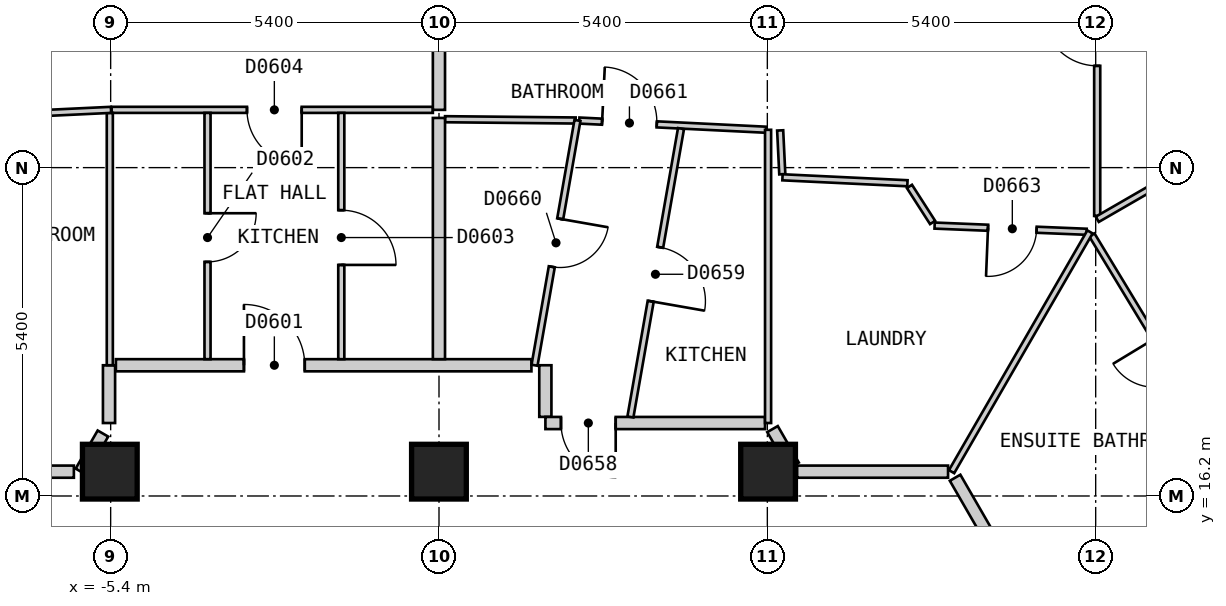
"""IFC4 building model, lengths in metres.
Left out: names, types, materials, properties, quantities, classifications, styles, units other than length and angle.
Written with IfcOpenShell. Run it as: python <this file> out.ifc"""

import sys

from ifc_helpers import new_model, si_unit, direction, frame, frame_2d, origin, origin_2d, place, context, subcontext, project, spatial, rectangle, extrude, element, fill, save


model = new_model("IFC4")
c1 = context("Model", 3, precision=1e-05, world=origin(), true_north=direction((0.0, 1.0)))
c2 = subcontext(c1, "Body", "Model", "MODEL_VIEW")
j1 = project(units=[si_unit("LENGTHUNIT", "METRE"), si_unit("PLANEANGLEUNIT", "RADIAN")], contexts=[c1])
p1 = place(None, origin())
s1 = spatial("IfcSite", under=j1, at=p1, CompositionType="ELEMENT")
p2 = place(p1, origin())
s2 = spatial("IfcBuilding", under=s1, at=p2, CompositionType="ELEMENT")
p3 = place(p2, frame((0.0, 0.0, 81.0)))
s3 = spatial("IfcBuildingStorey", under=s2, at=p3, CompositionType="ELEMENT", Elevation=81.0)
for number, where, z_axis, x_axis in (
    (1, (5.412, 16.6, 0.0), (0.0, 0.0, 1.0), (-1.0, 0.0, 0.0)),
    (2, (-0.001, 16.6, 0.0), (0.0, 0.0, 1.0), (-1.0, 0.0, 0.0)),
    (3, (-5.414, 16.6, 0.0), (0.0, 0.0, 1.0), (-1.0, 0.0, 0.0)),
):
    element("IfcColumn", number, at=place(p3, frame(where, z_axis=z_axis, x_axis=x_axis)), inside=s3, PredefinedType="COLUMN", context=c2, shape_type="SweptSolid", body=[
        extrude(rectangle(XDim=0.9, YDim=0.9, at=origin_2d()), origin(), (0.0, 0.0, 1.0), 3.0),
    ])
p4 = place(p3, frame((5.485, 17.3, 0.0), z_axis=(0.0, 0.0, 1.0), x_axis=(0.499437640892, -0.866349838611, 0.0)))
e4 = element("IfcWall", 4, at=p4, inside=s3, PredefinedType="PARTITIONING", context=c2, shape_type="SweptSolid", body=[
    extrude(rectangle(XDim=0.693, YDim=0.2, at=frame_2d((0.346, 0.0))), origin(), (0.0, 0.0, 1.0), 2.7),
])
p5 = place(p3, frame((8.488, 16.5, 0.0), z_axis=(0.0, 0.0, 1.0), x_axis=(0.499986836607, -0.86603300354, 0.0)))
e5 = element("IfcWall", 5, at=p5, inside=s3, PredefinedType="PARTITIONING", context=c2, shape_type="SweptSolid", body=[
    extrude(rectangle(XDim=20.09, YDim=0.2, at=frame_2d((10.045, 0.0))), origin(), (0.0, 0.0, 1.0), 2.7),
])
p6 = place(p5, frame((14.569, 0.0, 0.0)))
e6 = element("IfcOpeningElement", 6, at=p6, cuts=e5, PredefinedType="OPENING", context=c2, shape_type="SweptSolid", body=[
    extrude(rectangle(XDim=1.0, YDim=2.1, at=frame_2d((0.5, 1.05))), frame((0.0, 0.11, 0.0), z_axis=(0.0, -1.0, 0.0), x_axis=(1.0, 0.0, 0.0)), (0.0, 0.0, 1.0), 0.22),
])
p7 = place(p3, frame((1.749, 18.35, 0.0), z_axis=(0.0, 0.0, 1.0), x_axis=(0.0, -1.0, 0.0)))
e7 = element("IfcWall", 7, at=p7, inside=s3, PredefinedType="PARTITIONING", context=c2, shape_type="SweptSolid", body=[
    extrude(rectangle(XDim=0.849, YDim=0.2, at=frame_2d((0.425, 0.0))), origin(), (0.0, 0.0, 1.0), 2.7),
])
p8 = place(p3, frame((-8.314, 16.6, 0.0), z_axis=(0.0, 0.0, 1.0), x_axis=(1.0, 0.0, 0.0)))
e8 = element("IfcWall", 8, at=p8, inside=s3, PredefinedType="PARTITIONING", context=c2, shape_type="SweptSolid", body=[
    extrude(rectangle(XDim=2.309, YDim=0.2, at=frame_2d((1.155, 0.0))), origin(), (0.0, 0.0, 1.0), 2.7),
])
p9 = place(p3, frame((5.889, 16.6, 0.0), z_axis=(0.0, 0.0, 1.0), x_axis=(1.0, 0.0, 0.0)))
e9 = element("IfcWall", 9, at=p9, inside=s3, PredefinedType="PARTITIONING", context=c2, shape_type="SweptSolid", body=[
    extrude(rectangle(XDim=2.483, YDim=0.2, at=frame_2d((1.242, 0.0))), origin(), (0.0, 0.0, 1.0), 2.7),
])
p10 = place(p3, frame((1.75, 17.4, 0.0), z_axis=(0.0, 0.0, 1.0), x_axis=(1.0, 0.0, 0.0)))
e10 = element("IfcWall", 10, at=p10, inside=s3, PredefinedType="PARTITIONING", context=c2, shape_type="SweptSolid", body=[
    extrude(rectangle(XDim=3.612, YDim=0.2, at=frame_2d((1.806, 0.0))), origin(), (0.0, 0.0, 1.0), 2.7),
])
p11 = place(p10, frame((0.256, 0.0, 0.0)))
e11 = element("IfcOpeningElement", 11, at=p11, cuts=e10, PredefinedType="OPENING", context=c2, shape_type="SweptSolid", body=[
    extrude(rectangle(XDim=0.9, YDim=2.1, at=frame_2d((0.45, 1.05))), frame((0.0, 0.11, 0.0), z_axis=(0.0, -1.0, 0.0), x_axis=(1.0, 0.0, 0.0)), (0.0, 0.0, 1.0), 0.22),
])
p12 = place(p3, frame((-5.314, 18.35, 0.0), z_axis=(0.0, 0.0, 1.0), x_axis=(1.0, 0.0, 0.0)))
e12 = element("IfcWall", 12, at=p12, inside=s3, PredefinedType="PARTITIONING", context=c2, shape_type="SweptSolid", body=[
    extrude(rectangle(XDim=6.834, YDim=0.2, at=frame_2d((3.417, 0.0))), origin(), (0.0, 0.0, 1.0), 2.7),
])
p13 = place(p12, frame((2.106, 0.0, 0.0)))
e13 = element("IfcOpeningElement", 13, at=p13, cuts=e12, PredefinedType="OPENING", context=c2, shape_type="SweptSolid", body=[
    extrude(rectangle(XDim=1.0, YDim=2.1, at=frame_2d((0.5, 1.05))), frame((0.0, 0.11, 0.0), z_axis=(0.0, -1.0, 0.0), x_axis=(1.0, 0.0, 0.0)), (0.0, 0.0, 1.0), 0.22),
])
p14 = place(p3, frame((-5.889, 16.6, 0.0), z_axis=(0.0, 0.0, 1.0), x_axis=(0.499839240638, 0.866118198353, 0.0)))
e14 = element("IfcWall", 14, at=p14, inside=s3, PredefinedType="PARTITIONING", context=c2, shape_type="SweptSolid", body=[
    extrude(rectangle(XDim=0.724, YDim=0.2, at=frame_2d((0.362, 0.0))), origin(), (0.0, 0.0, 1.0), 2.7),
])
p15 = place(p3, frame((-5.427, 17.4, 0.0), z_axis=(0.0, 0.0, 1.0), x_axis=(0.0, 1.0, 0.0)))
e15 = element("IfcWall", 15, at=p15, inside=s3, PredefinedType="PARTITIONING", context=c2, shape_type="SweptSolid", body=[
    extrude(rectangle(XDim=0.95, YDim=0.2, at=frame_2d((0.475, 0.0))), origin(), (0.0, 0.0, 1.0), 2.7),
])
p16 = place(p3, frame((0.099, 22.396, 0.0), z_axis=(0.0, 0.0, 1.0), x_axis=(0.999952228611, -0.009774481889, 0.0)))
e16 = element("IfcWall", 16, at=p16, inside=s3, PredefinedType="PARTITIONING", context=c2, shape_type="SweptSolid", body=[
    extrude(rectangle(XDim=2.148, YDim=0.1, at=frame_2d((1.074, 0.0))), origin(), (0.0, 0.0, 1.0), 2.7),
])
p17 = place(p3, frame((7.737, 21.291, 0.0), z_axis=(0.0, 0.0, 1.0), x_axis=(0.540389876456, -0.841414749944, 0.0)))
e17 = element("IfcWall", 17, at=p17, inside=s3, PredefinedType="PARTITIONING", context=c2, shape_type="SweptSolid", body=[
    extrude(rectangle(XDim=0.705, YDim=0.1, at=frame_2d((0.353, 0.0))), origin(), (0.0, 0.0, 1.0), 2.7),
])
p18 = place(p3, frame((10.738, 20.492, 0.0), z_axis=(0.0, 0.0, 1.0), x_axis=(0.518100976056, -0.855319459974, 0.0)))
e18 = element("IfcWall", 18, at=p18, inside=s3, PredefinedType="PARTITIONING", context=c2, shape_type="SweptSolid", body=[
    extrude(rectangle(XDim=4.744, YDim=0.1, at=frame_2d((2.372, 0.0))), origin(), (0.0, 0.0, 1.0), 2.7),
])
p19 = place(p18, frame((1.992, 0.0, 0.0)))
e19 = element("IfcOpeningElement", 19, at=p19, cuts=e18, PredefinedType="OPENING", context=c2, shape_type="SweptSolid", body=[
    extrude(rectangle(XDim=0.8, YDim=2.1, at=frame_2d((0.4, 1.05))), frame((0.0, 0.06, 0.0), z_axis=(0.0, -1.0, 0.0), x_axis=(1.0, 0.0, 0.0)), (0.0, 0.0, 1.0), 0.12),
])
p20 = place(p3, frame((5.611, 22.212, 0.0), z_axis=(0.0, 0.0, 1.0), x_axis=(0.048368650834, -0.998829551834, 0.0)))
e20 = element("IfcWall", 20, at=p20, inside=s3, PredefinedType="PARTITIONING", context=c2, shape_type="SweptSolid", body=[
    extrude(rectangle(XDim=0.722, YDim=0.1, at=frame_2d((0.361, 0.0))), origin(), (0.0, 0.0, 1.0), 2.7),
])
p21 = place(p3, frame((8.151, 20.647, 0.0), z_axis=(0.0, 0.0, 1.0), x_axis=(0.999167241152, -0.040802257405, 0.0)))
e21 = element("IfcWall", 21, at=p21, inside=s3, PredefinedType="PARTITIONING", context=c2, shape_type="SweptSolid", body=[
    extrude(rectangle(XDim=2.501, YDim=0.1, at=frame_2d((1.25, 0.0))), origin(), (0.0, 0.0, 1.0), 2.7),
])
p22 = place(p21, frame((0.879, 0.0, 0.0)))
e22 = element("IfcOpeningElement", 22, at=p22, cuts=e21, PredefinedType="OPENING", context=c2, shape_type="SweptSolid", body=[
    extrude(rectangle(XDim=0.8, YDim=2.1, at=frame_2d((0.4, 1.05))), frame((0.0, 0.06, 0.0), z_axis=(0.0, -1.0, 0.0), x_axis=(1.0, 0.0, 0.0)), (0.0, 0.0, 1.0), 0.12),
])
p23 = place(p3, frame((5.649, 21.441, 0.0), z_axis=(0.0, 0.0, 1.0), x_axis=(0.998867332207, -0.047582062273, 0.0)))
e23 = element("IfcWall", 23, at=p23, inside=s3, PredefinedType="PARTITIONING", context=c2, shape_type="SweptSolid", body=[
    extrude(rectangle(XDim=2.058, YDim=0.1, at=frame_2d((1.029, 0.0))), origin(), (0.0, 0.0, 1.0), 2.7),
])
p24 = place(p3, frame((2.307, 22.374, 0.0), z_axis=(0.0, 0.0, 1.0), x_axis=(0.998794685853, -0.049083352695, 0.0)))
e24 = element("IfcWall", 24, at=p24, inside=s3, PredefinedType="PARTITIONING", context=c2, shape_type="SweptSolid", body=[
    extrude(rectangle(XDim=3.079, YDim=0.1, at=frame_2d((1.54, 0.0))), origin(), (0.0, 0.0, 1.0), 2.7),
])
p25 = place(p24, frame((0.376, 0.0, 0.0)))
e25 = element("IfcOpeningElement", 25, at=p25, cuts=e24, PredefinedType="OPENING", context=c2, shape_type="SweptSolid", body=[
    extrude(rectangle(XDim=0.9, YDim=2.1, at=frame_2d((0.45, 1.05))), frame((0.0, 0.06, 0.0), z_axis=(0.0, -1.0, 0.0), x_axis=(1.0, 0.0, 0.0)), (0.0, 0.0, 1.0), 0.12),
])
p26 = place(p3, frame((-5.384, 22.55, 0.0), z_axis=(0.0, 0.0, 1.0), x_axis=(1.0, 0.0, 0.0)))
e26 = element("IfcWall", 26, at=p26, inside=s3, PredefinedType="PARTITIONING", context=c2, shape_type="SweptSolid", body=[
    extrude(rectangle(XDim=5.283, YDim=0.1, at=frame_2d((2.642, 0.0))), origin(), (0.0, 0.0, 1.0), 2.7),
])
p27 = place(p26, frame((2.226, 0.0, 0.0)))
e27 = element("IfcOpeningElement", 27, at=p27, cuts=e26, PredefinedType="OPENING", context=c2, shape_type="SweptSolid", body=[
    extrude(rectangle(XDim=0.9, YDim=2.1, at=frame_2d((0.45, 1.05))), frame((0.0, 0.06, 0.0), z_axis=(0.0, -1.0, 0.0), x_axis=(1.0, 0.0, 0.0)), (0.0, 0.0, 1.0), 0.12),
])
p28 = place(p3, frame((8.43, 16.6, 0.0), z_axis=(0.0, 0.0, 1.0), x_axis=(0.499951460778, 0.866053426104, 0.0)))
e28 = element("IfcWall", 28, at=p28, inside=s3, PredefinedType="PARTITIONING", context=c2, shape_type="SweptSolid", body=[
    extrude(rectangle(XDim=4.553, YDim=0.1, at=frame_2d((2.276, 0.0))), origin(), (0.0, 0.0, 1.0), 2.7),
])
p29 = place(p3, frame((3.148, 17.5, 0.0), z_axis=(0.0, 0.0, 1.0), x_axis=(0.172821918451, 0.984953087463, 0.0)))
e29 = element("IfcWall", 29, at=p29, inside=s3, PredefinedType="PARTITIONING", context=c2, shape_type="SweptSolid", body=[
    extrude(rectangle(XDim=4.814, YDim=0.1, at=frame_2d((2.407, 0.0))), origin(), (0.0, 0.0, 1.0), 2.7),
])
p30 = place(p29, frame((1.932, 0.0, 0.0)))
e30 = element("IfcOpeningElement", 30, at=p30, cuts=e29, PredefinedType="OPENING", context=c2, shape_type="SweptSolid", body=[
    extrude(rectangle(XDim=0.9, YDim=2.1, at=frame_2d((0.45, 1.05))), frame((0.0, 0.06, 0.0), z_axis=(0.0, -1.0, 0.0), x_axis=(1.0, 0.0, 0.0)), (0.0, 0.0, 1.0), 0.12),
])
p31 = place(p3, frame((1.571, 18.35, 0.0), z_axis=(0.0, 0.0, 1.0), x_axis=(0.172742546726, 0.984967010895, 0.0)))
e31 = element("IfcWall", 31, at=p31, inside=s3, PredefinedType="PARTITIONING", context=c2, shape_type="SweptSolid", body=[
    extrude(rectangle(XDim=4.087, YDim=0.1, at=frame_2d((2.044, 0.0))), origin(), (0.0, 0.0, 1.0), 2.7),
])
p32 = place(p31, frame((1.644, 0.0, 0.0)))
e32 = element("IfcOpeningElement", 32, at=p32, cuts=e31, PredefinedType="OPENING", context=c2, shape_type="SweptSolid", body=[
    extrude(rectangle(XDim=0.8, YDim=2.1, at=frame_2d((0.4, 1.05))), frame((0.0, 0.06, 0.0), z_axis=(0.0, -1.0, 0.0), x_axis=(1.0, 0.0, 0.0)), (0.0, 0.0, 1.0), 0.12),
])
p33 = place(p3, frame((5.412, 17.4, 0.0), z_axis=(0.0, 0.0, 1.0), x_axis=(0.0, 1.0, 0.0)))
e33 = element("IfcWall", 33, at=p33, inside=s3, PredefinedType="PARTITIONING", context=c2, shape_type="SweptSolid", body=[
    extrude(rectangle(XDim=4.822, YDim=0.1, at=frame_2d((2.411, 0.0))), origin(), (0.0, 0.0, 1.0), 2.7),
])
p34 = place(p3, frame((10.825, 20.806, 0.0), z_axis=(0.0, 0.0, 1.0), x_axis=(0.0, 1.0, 0.0)))
e34 = element("IfcWall", 34, at=p34, inside=s3, PredefinedType="PARTITIONING", context=c2, shape_type="SweptSolid", body=[
    extrude(rectangle(XDim=5.894, YDim=0.1, at=frame_2d((2.947, 0.0))), origin(), (0.0, 0.0, 1.0), 2.7),
])
p35 = place(p34, frame((2.468, 0.0, 0.0)))
e35 = element("IfcOpeningElement", 35, at=p35, cuts=e34, PredefinedType="OPENING", context=c2, shape_type="SweptSolid", body=[
    extrude(rectangle(XDim=0.9, YDim=2.1, at=frame_2d((0.45, 1.05))), frame((0.0, 0.06, 0.0), z_axis=(0.0, -1.0, 0.0), x_axis=(1.0, 0.0, 0.0)), (0.0, 0.0, 1.0), 0.12),
])
p36 = place(p3, frame((-3.807, 18.45, 0.0), z_axis=(0.0, 0.0, 1.0), x_axis=(0.0, 1.0, 0.0)))
e36 = element("IfcWall", 36, at=p36, inside=s3, PredefinedType="PARTITIONING", context=c2, shape_type="SweptSolid", body=[
    extrude(rectangle(XDim=4.05, YDim=0.1, at=frame_2d((2.025, 0.0))), origin(), (0.0, 0.0, 1.0), 2.7),
])
p37 = place(p36, frame((1.6, 0.0, 0.0)))
e37 = element("IfcOpeningElement", 37, at=p37, cuts=e36, PredefinedType="OPENING", context=c2, shape_type="SweptSolid", body=[
    extrude(rectangle(XDim=0.8, YDim=2.1, at=frame_2d((0.4, 1.05))), frame((0.0, 0.06, 0.0), z_axis=(0.0, -1.0, 0.0), x_axis=(1.0, 0.0, 0.0)), (0.0, 0.0, 1.0), 0.12),
])
p38 = place(p3, frame((-5.414, 18.35, 0.0), z_axis=(0.0, 0.0, 1.0), x_axis=(0.0, 1.0, 0.0)))
e38 = element("IfcWall", 38, at=p38, inside=s3, PredefinedType="PARTITIONING", context=c2, shape_type="SweptSolid", body=[
    extrude(rectangle(XDim=4.15, YDim=0.1, at=frame_2d((2.075, 0.0))), origin(), (0.0, 0.0, 1.0), 2.7),
])
p39 = place(p3, frame((-1.607, 18.45, 0.0), z_axis=(0.0, 0.0, 1.0), x_axis=(0.0, 1.0, 0.0)))
e39 = element("IfcWall", 39, at=p39, inside=s3, PredefinedType="PARTITIONING", context=c2, shape_type="SweptSolid", body=[
    extrude(rectangle(XDim=4.05, YDim=0.1, at=frame_2d((2.025, 0.0))), origin(), (0.0, 0.0, 1.0), 2.7),
])
p40 = place(p39, frame((1.55, 0.0, 0.0)))
e40 = element("IfcOpeningElement", 40, at=p40, cuts=e39, PredefinedType="OPENING", context=c2, shape_type="SweptSolid", body=[
    extrude(rectangle(XDim=0.9, YDim=2.1, at=frame_2d((0.45, 1.05))), frame((0.0, 0.06, 0.0), z_axis=(0.0, -1.0, 0.0), x_axis=(1.0, 0.0, 0.0)), (0.0, 0.0, 1.0), 0.12),
])
p41 = place(p3, frame((-9.435, 22.358, 0.0), z_axis=(0.0, 0.0, 1.0), x_axis=(0.998871548472, 0.04749346959, 0.0)))
e41 = element("IfcWall", 41, at=p41, inside=s3, PredefinedType="PARTITIONING", context=c2, shape_type="SweptSolid", body=[
    extrude(rectangle(XDim=4.046, YDim=0.1, at=frame_2d((2.023, 0.0))), origin(), (0.0, 0.0, 1.0), 2.7),
])
p42 = place(p41, frame((1.555, 0.0, 0.0)))
e42 = element("IfcOpeningElement", 42, at=p42, cuts=e41, PredefinedType="OPENING", context=c2, shape_type="SweptSolid", body=[
    extrude(rectangle(XDim=0.8, YDim=2.1, at=frame_2d((0.4, 1.05))), frame((0.0, 0.06, 0.0), z_axis=(0.0, -1.0, 0.0), x_axis=(1.0, 0.0, 0.0)), (0.0, 0.0, 1.0), 0.12),
])
p43 = place(p3, frame((10.826, 20.75, 0.0), z_axis=(0.0, 0.0, 1.0), x_axis=(0.865986712877, 0.50006700863, 0.0)))
e43 = element("IfcWall", 43, at=p43, inside=s3, PredefinedType="PARTITIONING", context=c2, shape_type="SweptSolid", body=[
    extrude(rectangle(XDim=5.949, YDim=0.1, at=frame_2d((2.975, 0.0))), origin(), (0.0, 0.0, 1.0), 2.7),
])
p44 = place(p43, frame((2.524, 0.0, 0.0)))
e44 = element("IfcOpeningElement", 44, at=p44, cuts=e43, PredefinedType="OPENING", context=c2, shape_type="SweptSolid", body=[
    extrude(rectangle(XDim=0.9, YDim=2.1, at=frame_2d((0.45, 1.05))), frame((0.0, 0.06, 0.0), z_axis=(0.0, -1.0, 0.0), x_axis=(1.0, 0.0, 0.0)), (0.0, 0.0, 1.0), 0.12),
])
p45 = place(p3, frame((-0.001, 18.45, 0.0), z_axis=(0.0, 0.0, 1.0), x_axis=(0.0, 1.0, 0.0)))
e45 = element("IfcWall", 45, at=p45, inside=s3, PredefinedType="PARTITIONING", context=c2, shape_type="SweptSolid", body=[
    extrude(rectangle(XDim=3.967, YDim=0.2, at=frame_2d((1.983, 0.0))), origin(), (0.0, 0.0, 1.0), 2.7),
])
p46 = place(p3, frame((-0.001, 22.55, 0.0), z_axis=(0.0, 0.0, 1.0), x_axis=(0.0, 1.0, 0.0)))
e46 = element("IfcWall", 46, at=p46, inside=s3, PredefinedType="PARTITIONING", context=c2, shape_type="SweptSolid", body=[
    extrude(rectangle(XDim=4.15, YDim=0.2, at=frame_2d((2.075, 0.0))), origin(), (0.0, 0.0, 1.0), 2.7),
])
p47 = place(p3, frame((9.83, 14.375, 0.0), z_axis=(0.0, 0.0, 1.0), x_axis=(0.866016855193, 0.500014806302, 0.0)))
e47 = element("IfcWall", 47, at=p47, inside=s3, PredefinedType="PARTITIONING", context=c2, shape_type="SweptSolid", body=[
    extrude(rectangle(XDim=10.0, YDim=0.2, at=frame_2d((5.0, 0.0))), origin(), (0.0, 0.0, 1.0), 2.7),
])
p48 = place(p13, origin())
e48 = element("IfcDoor", 48, at=p48, inside=s3, OperationType="SINGLE_SWING_LEFT", PredefinedType="DOOR", context=c2, shape_type="SweptSolid", body=[
    extrude(rectangle(XDim=1.0, YDim=2.1, at=frame_2d((0.5, 1.05))), frame((0.0, 0.025, 0.0), z_axis=(0.0, -1.0, 0.0), x_axis=(1.0, 0.0, 0.0)), (0.0, 0.0, 1.0), 0.05),
])
fill(e13, e48)
p49 = place(p37, origin())
e49 = element("IfcDoor", 49, at=p49, inside=s3, OperationType="SINGLE_SWING_RIGHT", PredefinedType="DOOR", context=c2, shape_type="SweptSolid", body=[
    extrude(rectangle(XDim=0.8, YDim=2.1, at=frame_2d((0.4, 1.05))), frame((0.0, 0.025, 0.0), z_axis=(0.0, -1.0, 0.0), x_axis=(1.0, 0.0, 0.0)), (0.0, 0.0, 1.0), 0.05),
])
fill(e37, e49)
p50 = place(p40, origin())
e50 = element("IfcDoor", 50, at=p50, inside=s3, OperationType="SINGLE_SWING_LEFT", PredefinedType="DOOR", context=c2, shape_type="SweptSolid", body=[
    extrude(rectangle(XDim=0.9, YDim=2.1, at=frame_2d((0.45, 1.05))), frame((0.0, 0.025, 0.0), z_axis=(0.0, -1.0, 0.0), x_axis=(1.0, 0.0, 0.0)), (0.0, 0.0, 1.0), 0.05),
])
fill(e40, e50)
p51 = place(p27, origin())
e51 = element("IfcDoor", 51, at=p51, inside=s3, OperationType="SINGLE_SWING_RIGHT", PredefinedType="DOOR", context=c2, shape_type="SweptSolid", body=[
    extrude(rectangle(XDim=0.9, YDim=2.1, at=frame_2d((0.45, 1.05))), frame((0.0, 0.025, 0.0), z_axis=(0.0, -1.0, 0.0), x_axis=(1.0, 0.0, 0.0)), (0.0, 0.0, 1.0), 0.05),
])
fill(e27, e51)
p52 = place(p11, origin())
e52 = element("IfcDoor", 52, at=p52, inside=s3, OperationType="SINGLE_SWING_RIGHT", PredefinedType="DOOR", context=c2, shape_type="SweptSolid", body=[
    extrude(rectangle(XDim=0.9, YDim=2.1, at=frame_2d((0.45, 1.05))), frame((0.0, 0.025, 0.0), z_axis=(0.0, -1.0, 0.0), x_axis=(1.0, 0.0, 0.0)), (0.0, 0.0, 1.0), 0.05),
])
fill(e11, e52)
p53 = place(p30, origin())
e53 = element("IfcDoor", 53, at=p53, inside=s3, OperationType="SINGLE_SWING_LEFT", PredefinedType="DOOR", context=c2, shape_type="SweptSolid", body=[
    extrude(rectangle(XDim=0.9, YDim=2.1, at=frame_2d((0.45, 1.05))), frame((0.0, 0.025, 0.0), z_axis=(0.0, -1.0, 0.0), x_axis=(1.0, 0.0, 0.0)), (0.0, 0.0, 1.0), 0.05),
])
fill(e30, e53)
p54 = place(p32, origin())
e54 = element("IfcDoor", 54, at=p54, inside=s3, OperationType="SINGLE_SWING_RIGHT", PredefinedType="DOOR", context=c2, shape_type="SweptSolid", body=[
    extrude(rectangle(XDim=0.8, YDim=2.1, at=frame_2d((0.4, 1.05))), frame((0.0, 0.025, 0.0), z_axis=(0.0, -1.0, 0.0), x_axis=(1.0, 0.0, 0.0)), (0.0, 0.0, 1.0), 0.05),
])
fill(e32, e54)
p55 = place(p25, origin())
e55 = element("IfcDoor", 55, at=p55, inside=s3, OperationType="SINGLE_SWING_LEFT", PredefinedType="DOOR", context=c2, shape_type="SweptSolid", body=[
    extrude(rectangle(XDim=0.9, YDim=2.1, at=frame_2d((0.45, 1.05))), frame((0.0, 0.025, 0.0), z_axis=(0.0, -1.0, 0.0), x_axis=(1.0, 0.0, 0.0)), (0.0, 0.0, 1.0), 0.05),
])
fill(e25, e55)
p56 = place(p35, origin())
e56 = element("IfcDoor", 56, at=p56, inside=s3, OperationType="SINGLE_SWING_RIGHT", PredefinedType="DOOR", context=c2, shape_type="SweptSolid", body=[
    extrude(rectangle(XDim=0.9, YDim=2.1, at=frame_2d((0.45, 1.05))), frame((0.0, 0.025, 0.0), z_axis=(0.0, -1.0, 0.0), x_axis=(1.0, 0.0, 0.0)), (0.0, 0.0, 1.0), 0.05),
])
fill(e35, e56)
p57 = place(p22, origin())
e57 = element("IfcDoor", 57, at=p57, inside=s3, OperationType="SINGLE_SWING_LEFT", PredefinedType="DOOR", context=c2, shape_type="SweptSolid", body=[
    extrude(rectangle(XDim=0.8, YDim=2.1, at=frame_2d((0.4, 1.05))), frame((0.0, 0.025, 0.0), z_axis=(0.0, -1.0, 0.0), x_axis=(1.0, 0.0, 0.0)), (0.0, 0.0, 1.0), 0.05),
])
fill(e22, e57)
save(model, sys.argv[1])
